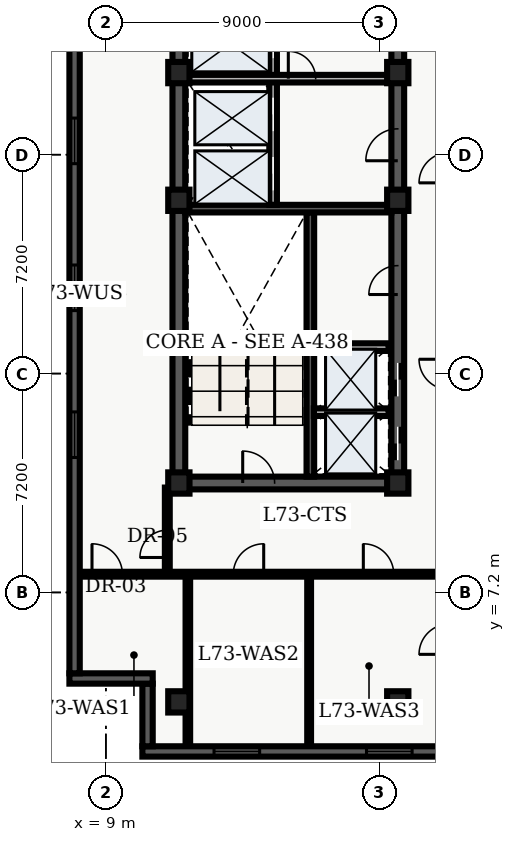
"""IFC4 building model, lengths in metres.
Left out: names, types, materials, properties, quantities, classifications, styles, units other than length and angle.
Written with IfcOpenShell. Run it as: python <this file> out.ifc"""

import sys

from ifc_helpers import new_model, entity, si_unit, converted_unit, direction, frame, origin_with_axes, origin_2d_with_axis, place, context, subcontext, project, spatial, polyline, rectangle, outline, extrude, element, fill, save


model = new_model("IFC4")
c1 = context("Model", 3, precision=1e-05, world=origin_with_axes(), true_north=direction((0.0, 1.0)))
c2 = subcontext(c1, "Body", "Model", "MODEL_VIEW")
j1 = project(units=[si_unit("LENGTHUNIT", "METRE"), converted_unit("PLANEANGLEUNIT", "DEGREE", entity("IfcPlaneAngleMeasure", 0.017), si_unit("PLANEANGLEUNIT", "RADIAN"), dimensions=[0, 0, 0, 0, 0, 0, 0])], contexts=[c1])
p1 = place(None, origin_with_axes())
s1 = spatial("IfcSite", under=j1, at=p1, CompositionType="ELEMENT")
p2 = place(p1, origin_with_axes())
s2 = spatial("IfcBuilding", under=s1, at=p2, CompositionType="ELEMENT")
p3 = place(p2, frame((0.0, 0.0, 295.8), z_axis=(0.0, 0.0, 1.0), x_axis=(1.0, 0.0, 0.0)))
s3 = spatial("IfcBuildingStorey", under=s2, at=p3, CompositionType="ELEMENT", Elevation=295.8)
p4 = place(p3, frame((11.4, 10.8, 0.0), z_axis=(0.0, 0.0, 1.0), x_axis=(0.0, 1.0, 0.0)))
e1 = element("IfcWall", 1, at=p4, inside=s3, PredefinedType="SHEAR", context=c2, shape_type="SweptSolid", body=[
    extrude(outline(polyline([(0.0, -0.21), (27.0, -0.21), (27.0, 0.21), (0.0, 0.21), (0.0, -0.21)])), origin_with_axes(), (0.0, 0.0, 1.0), 3.66),
])
p5 = place(p3, frame((11.4, 10.8, 0.0), z_axis=(0.0, 0.0, 1.0), x_axis=(1.0, 0.0, 0.0)))
e2 = element("IfcWall", 2, at=p5, inside=s3, PredefinedType="SHEAR", context=c2, shape_type="SweptSolid", body=[
    extrude(outline(polyline([(0.0, -0.21), (7.2, -0.21), (7.2, 0.21), (0.0, 0.21), (0.0, -0.21)])), origin_with_axes(), (0.0, 0.0, 1.0), 3.66),
])
p6 = place(p5, frame((2.625, 0.0, 0.0), z_axis=(0.0, 0.0, 1.0), x_axis=(1.0, 0.0, 0.0)))
e3 = element("IfcOpeningElement", 3, at=p6, cuts=e2, PredefinedType="OPENING", context=c2, shape_type="SweptSolid", body=[
    extrude(rectangle(XDim=1.05, YDim=0.44, at=origin_2d_with_axis()), origin_with_axes(), (0.0, 0.0, 1.0), 2.15),
])
p7 = place(p3, frame((18.6, 10.8, 0.0), z_axis=(0.0, 0.0, 1.0), x_axis=(0.0, 1.0, 0.0)))
e4 = element("IfcWall", 4, at=p7, inside=s3, PredefinedType="SHEAR", context=c2, shape_type="SweptSolid", body=[
    extrude(outline(polyline([(0.0, -0.21), (13.5, -0.21), (13.5, 0.21), (0.0, 0.21), (0.0, -0.21)])), origin_with_axes(), (0.0, 0.0, 1.0), 3.66),
])
p8 = place(p7, frame((1.3, 0.0, 0.0), z_axis=(0.0, 0.0, 1.0), x_axis=(1.0, 0.0, 0.0)))
e5 = element("IfcOpeningElement", 5, at=p8, cuts=e4, PredefinedType="OPENING", context=c2, shape_type="SweptSolid", body=[
    extrude(rectangle(XDim=1.1, YDim=0.44, at=origin_2d_with_axis()), origin_with_axes(), (0.0, 0.0, 1.0), 2.15),
])
p9 = place(p7, frame((3.4, 0.0, 0.0), z_axis=(0.0, 0.0, 1.0), x_axis=(1.0, 0.0, 0.0)))
e6 = element("IfcOpeningElement", 6, at=p9, cuts=e4, PredefinedType="OPENING", context=c2, shape_type="SweptSolid", body=[
    extrude(rectangle(XDim=1.1, YDim=0.44, at=origin_2d_with_axis()), origin_with_axes(), (0.0, 0.0, 1.0), 2.15),
])
p10 = place(p7, frame((11.125, 0.0, 0.0), z_axis=(0.0, 0.0, 1.0), x_axis=(1.0, 0.0, 0.0)))
e7 = element("IfcOpeningElement", 7, at=p10, cuts=e4, PredefinedType="OPENING", context=c2, shape_type="SweptSolid", body=[
    extrude(rectangle(XDim=1.05, YDim=0.44, at=origin_2d_with_axis()), origin_with_axes(), (0.0, 0.0, 1.0), 2.15),
])
p11 = place(p7, frame((6.675, 0.0, 0.0), z_axis=(0.0, 0.0, 1.0), x_axis=(1.0, 0.0, 0.0)))
e8 = element("IfcOpeningElement", 8, at=p11, cuts=e4, PredefinedType="OPENING", context=c2, shape_type="SweptSolid", body=[
    extrude(rectangle(XDim=0.95, YDim=0.44, at=origin_2d_with_axis()), origin_with_axes(), (0.0, 0.0, 1.0), 2.15),
])
p12 = place(p3, frame((18.6, 24.3, 0.0), z_axis=(0.0, 0.0, 1.0), x_axis=(0.0, 1.0, 0.0)))
e9 = element("IfcWall", 9, at=p12, inside=s3, PredefinedType="SHEAR", context=c2, shape_type="SweptSolid", body=[
    extrude(outline(polyline([(0.0, -0.21), (13.5, -0.21), (13.5, 0.21), (0.0, 0.21), (0.0, -0.21)])), origin_with_axes(), (0.0, 0.0, 1.0), 3.66),
])
p13 = place(p12, frame((8.525, 0.0, 0.0), z_axis=(0.0, 0.0, 1.0), x_axis=(1.0, 0.0, 0.0)))
e10 = element("IfcOpeningElement", 10, at=p13, cuts=e9, PredefinedType="OPENING", context=c2, shape_type="SweptSolid", body=[
    extrude(rectangle(XDim=1.05, YDim=0.44, at=origin_2d_with_axis()), origin_with_axes(), (0.0, 0.0, 1.0), 2.15),
])
p14 = place(p3, frame((15.725, 11.01, 0.0), z_axis=(0.0, 0.0, 1.0), x_axis=(0.0, 1.0, 0.0)))
e11 = element("IfcWall", 11, at=p14, inside=s3, PredefinedType="SHEAR", context=c2, shape_type="SweptSolid", body=[
    extrude(outline(polyline([(0.0, -0.125), (8.69, -0.125), (8.69, 0.125), (0.0, 0.125), (0.0, -0.125)])), origin_with_axes(), (0.0, 0.0, 1.0), 3.66),
])
p15 = place(p3, frame((11.61, 19.825, 0.0), z_axis=(0.0, 0.0, 1.0), x_axis=(1.0, 0.0, 0.0)))
e12 = element("IfcWall", 12, at=p15, inside=s3, PredefinedType="SHEAR", context=c2, shape_type="SweptSolid", body=[
    extrude(outline(polyline([(0.0, -0.125), (6.78, -0.125), (6.78, 0.125), (0.0, 0.125), (0.0, -0.125)])), origin_with_axes(), (0.0, 0.0, 1.0), 3.66),
])
p16 = place(p3, frame((14.5, 19.95, 0.0), z_axis=(0.0, 0.0, 1.0), x_axis=(0.0, 1.0, 0.0)))
e13 = element("IfcWall", 13, at=p16, inside=s3, PredefinedType="SOLIDWALL", context=c2, shape_type="SweptSolid", body=[
    extrude(outline(polyline([(0.0, -0.125), (6.25, -0.125), (6.25, 0.125), (0.0, 0.125), (0.0, -0.125)])), origin_with_axes(), (0.0, 0.0, 1.0), 2.7),
])
p17 = place(p16, frame((1.025, 0.0, 0.0), z_axis=(0.0, 0.0, 1.0), x_axis=(1.0, 0.0, 0.0)))
e14 = element("IfcOpeningElement", 14, at=p17, cuts=e13, PredefinedType="OPENING", context=c2, shape_type="SweptSolid", body=[
    extrude(rectangle(XDim=1.1, YDim=0.27, at=origin_2d_with_axis()), origin_with_axes(), (0.0, 0.0, 1.0), 2.15),
])
p18 = place(p16, frame((2.975, 0.0, 0.0), z_axis=(0.0, 0.0, 1.0), x_axis=(1.0, 0.0, 0.0)))
e15 = element("IfcOpeningElement", 15, at=p18, cuts=e13, PredefinedType="OPENING", context=c2, shape_type="SweptSolid", body=[
    extrude(rectangle(XDim=1.1, YDim=0.27, at=origin_2d_with_axis()), origin_with_axes(), (0.0, 0.0, 1.0), 2.15),
])
p19 = place(p16, frame((5.425, 0.0, 0.0), z_axis=(0.0, 0.0, 1.0), x_axis=(1.0, 0.0, 0.0)))
e16 = element("IfcOpeningElement", 16, at=p19, cuts=e13, PredefinedType="OPENING", context=c2, shape_type="SweptSolid", body=[
    extrude(rectangle(XDim=1.2, YDim=0.27, at=origin_2d_with_axis()), origin_with_axes(), (0.0, 0.0, 1.0), 2.15),
])
p20 = place(p3, frame((11.7, 24.1, 0.0), z_axis=(0.0, 0.0, 1.0), x_axis=(1.0, 0.0, 0.0)))
e17 = element("IfcWall", 17, at=p20, inside=s3, PredefinedType="SOLIDWALL", context=c2, shape_type="SweptSolid", body=[
    extrude(outline(polyline([(0.0, -0.125), (6.6, -0.125), (6.6, 0.125), (0.0, 0.125), (0.0, -0.125)])), origin_with_axes(), (0.0, 0.0, 1.0), 2.7),
])
p21 = place(p20, frame((3.75, 0.0, 0.0), z_axis=(0.0, 0.0, 1.0), x_axis=(1.0, 0.0, 0.0)))
e18 = element("IfcOpeningElement", 18, at=p21, cuts=e17, PredefinedType="OPENING", context=c2, shape_type="SweptSolid", body=[
    extrude(rectangle(XDim=0.9, YDim=0.27, at=origin_2d_with_axis()), origin_with_axes(), (0.0, 0.0, 1.0), 2.15),
])
for number, where, z_axis, x_axis in (
    (19, (11.4, 3.6, 0.0), (0.0, 0.0, 1.0), (1.0, 0.0, 0.0)),
    (20, (11.4, 10.8, 0.0), (0.0, 0.0, 1.0), (1.0, 0.0, 0.0)),
    (21, (11.4, 20.1, 0.0), (0.0, 0.0, 1.0), (1.0, 0.0, 0.0)),
    (22, (11.4, 24.3, 0.0), (0.0, 0.0, 1.0), (1.0, 0.0, 0.0)),
    (23, (18.6, 3.6, 0.0), (0.0, 0.0, 1.0), (1.0, 0.0, 0.0)),
    (24, (18.6, 10.8, 0.0), (0.0, 0.0, 1.0), (1.0, 0.0, 0.0)),
    (25, (18.6, 20.1, 0.0), (0.0, 0.0, 1.0), (1.0, 0.0, 0.0)),
    (26, (18.6, 24.3, 0.0), (0.0, 0.0, 1.0), (1.0, 0.0, 0.0)),
):
    element("IfcColumn", number, at=place(p3, frame(where, z_axis=z_axis, x_axis=x_axis)), inside=s3, PredefinedType="COLUMN", context=c2, shape_type="SweptSolid", body=[
        extrude(rectangle(XDim=0.7, YDim=0.7, at=origin_2d_with_axis()), origin_with_axes(), (0.0, 0.0, 1.0), 3.9),
    ])
for number, where, z_axis, x_axis in (
    (27, (15.84, 13.13, 0.0), (0.0, 0.0, 1.0), (1.0, 0.0, 0.0)),
    (28, (15.84, 15.27, 0.0), (0.0, 0.0, 1.0), (1.0, 0.0, 0.0)),
):
    element("IfcWall", number, at=place(p3, frame(where, z_axis=z_axis, x_axis=x_axis)), inside=s3, PredefinedType="SOLIDWALL", context=c2, shape_type="SweptSolid", body=[
        extrude(outline(polyline([(0.0, -0.125), (2.46, -0.125), (2.46, 0.125), (0.0, 0.125), (0.0, -0.125)])), origin_with_axes(), (0.0, 0.0, 1.0), 2.7),
    ])
p22 = place(p3, frame((8.135, 7.8, 0.0), z_axis=(0.0, 0.0, 1.0), x_axis=(1.0, 0.0, 0.0)))
e29 = element("IfcWall", 29, at=p22, inside=s3, PredefinedType="PARTITIONING", context=c2, shape_type="SweptSolid", body=[
    extrude(outline(polyline([(0.0, -0.08), (12.165, -0.08), (12.165, 0.08), (0.0, 0.08), (0.0, -0.08)])), origin_with_axes(), (0.0, 0.0, 1.0), 2.7),
])
p23 = place(p22, frame((0.908, 0.0, 0.0), z_axis=(0.0, 0.0, 1.0), x_axis=(1.0, 0.0, 0.0)))
e30 = element("IfcOpeningElement", 30, at=p23, cuts=e29, PredefinedType="OPENING", context=c2, shape_type="SweptSolid", body=[
    extrude(rectangle(XDim=1.0, YDim=0.18, at=origin_2d_with_axis()), origin_with_axes(), (0.0, 0.0, 1.0), 2.15),
])
p24 = place(p22, frame((5.556, 0.0, 0.0), z_axis=(0.0, 0.0, 1.0), x_axis=(1.0, 0.0, 0.0)))
e31 = element("IfcOpeningElement", 31, at=p24, cuts=e29, PredefinedType="OPENING", context=c2, shape_type="SweptSolid", body=[
    extrude(rectangle(XDim=1.0, YDim=0.18, at=origin_2d_with_axis()), origin_with_axes(), (0.0, 0.0, 1.0), 2.15),
])
p25 = place(p22, frame((9.832, 0.0, 0.0), z_axis=(0.0, 0.0, 1.0), x_axis=(1.0, 0.0, 0.0)))
e32 = element("IfcOpeningElement", 32, at=p25, cuts=e29, PredefinedType="OPENING", context=c2, shape_type="SweptSolid", body=[
    extrude(rectangle(XDim=1.0, YDim=0.18, at=origin_2d_with_axis()), origin_with_axes(), (0.0, 0.0, 1.0), 2.15),
])
p26 = place(p3, frame((11.02, 7.8, 0.0), z_axis=(0.0, 0.0, 1.0), x_axis=(0.0, 1.0, 0.0)))
e33 = element("IfcWall", 33, at=p26, inside=s3, PredefinedType="PARTITIONING", context=c2, shape_type="SweptSolid", body=[
    extrude(outline(polyline([(0.0, -0.08), (2.85, -0.08), (2.85, 0.08), (0.0, 0.08), (0.0, -0.08)])), origin_with_axes(), (0.0, 0.0, 1.0), 2.7),
])
p27 = place(p26, frame((1.0, 0.0, 0.0), z_axis=(0.0, 0.0, 1.0), x_axis=(1.0, 0.0, 0.0)))
e34 = element("IfcOpeningElement", 34, at=p27, cuts=e33, PredefinedType="OPENING", context=c2, shape_type="SweptSolid", body=[
    extrude(rectangle(XDim=0.9, YDim=0.18, at=origin_2d_with_axis()), origin_with_axes(), (0.0, 0.0, 1.0), 2.15),
])
p28 = place(p3, frame((11.696, 2.135, 0.0), z_axis=(0.0, 0.0, 1.0), x_axis=(0.0, 1.0, 0.0)))
e35 = element("IfcWall", 35, at=p28, inside=s3, PredefinedType="PARTITIONING", context=c2, shape_type="SweptSolid", body=[
    extrude(outline(polyline([(0.0, -0.075), (5.565, -0.075), (5.565, 0.075), (0.0, 0.075), (0.0, -0.075)])), origin_with_axes(), (0.0, 0.0, 1.0), 2.7),
])
p29 = place(p3, frame((15.685, 2.135, 0.0), z_axis=(0.0, 0.0, 1.0), x_axis=(0.0, 1.0, 0.0)))
e36 = element("IfcWall", 36, at=p29, inside=s3, PredefinedType="PARTITIONING", context=c2, shape_type="SweptSolid", body=[
    extrude(outline(polyline([(0.0, -0.062), (5.565, -0.062), (5.565, 0.062), (0.0, 0.062), (0.0, -0.062)])), origin_with_axes(), (0.0, 0.0, 1.0), 2.7),
])
p30 = place(p3, frame((31.46, 1.97, 0.0), z_axis=(0.0, 0.0, 1.0), x_axis=(-1.0, 0.0, 0.0)))
e37 = element("IfcWall", 37, at=p30, inside=s3, PredefinedType="SOLIDWALL", context=c2, shape_type="SweptSolid", body=[
    extrude(outline(polyline([(0.0, -0.17), (21.26, -0.17), (21.26, 0.17), (0.0, 0.17), (0.0, -0.17)])), origin_with_axes(), (0.0, 0.0, 1.0), 3.66),
])
p31 = place(p30, frame((2.658, 0.0, 0.45), z_axis=(0.0, 0.0, 1.0), x_axis=(1.0, 0.0, 0.0)))
e38 = element("IfcOpeningElement", 38, at=p31, cuts=e37, PredefinedType="OPENING", context=c2, shape_type="SweptSolid", body=[
    extrude(rectangle(XDim=1.5, YDim=0.36, at=origin_2d_with_axis()), origin_with_axes(), (0.0, 0.0, 1.0), 2.1),
])
p32 = place(p30, frame((8.123, 0.0, 0.45), z_axis=(0.0, 0.0, 1.0), x_axis=(1.0, 0.0, 0.0)))
e39 = element("IfcOpeningElement", 39, at=p32, cuts=e37, PredefinedType="OPENING", context=c2, shape_type="SweptSolid", body=[
    extrude(rectangle(XDim=1.5, YDim=0.36, at=origin_2d_with_axis()), origin_with_axes(), (0.0, 0.0, 1.0), 2.1),
])
p33 = place(p30, frame((13.138, 0.0, 0.45), z_axis=(0.0, 0.0, 1.0), x_axis=(1.0, 0.0, 0.0)))
e40 = element("IfcOpeningElement", 40, at=p33, cuts=e37, PredefinedType="OPENING", context=c2, shape_type="SweptSolid", body=[
    extrude(rectangle(XDim=1.5, YDim=0.36, at=origin_2d_with_axis()), origin_with_axes(), (0.0, 0.0, 1.0), 2.1),
])
p34 = place(p30, frame((18.153, 0.0, 0.45), z_axis=(0.0, 0.0, 1.0), x_axis=(1.0, 0.0, 0.0)))
e41 = element("IfcOpeningElement", 41, at=p34, cuts=e37, PredefinedType="OPENING", context=c2, shape_type="SweptSolid", body=[
    extrude(rectangle(XDim=1.5, YDim=0.36, at=origin_2d_with_axis()), origin_with_axes(), (0.0, 0.0, 1.0), 2.1),
])
p35 = place(p3, frame((10.37, 2.14, 0.0), z_axis=(0.0, 0.0, 1.0), x_axis=(0.0, 1.0, 0.0)))
e42 = element("IfcWall", 42, at=p35, inside=s3, PredefinedType="SOLIDWALL", context=c2, shape_type="SweptSolid", body=[
    extrude(outline(polyline([(0.0, -0.17), (2.06, -0.17), (2.06, 0.17), (0.0, 0.17), (0.0, -0.17)])), origin_with_axes(), (0.0, 0.0, 1.0), 3.66),
])
p36 = place(p3, frame((10.54, 4.37, 0.0), z_axis=(0.0, 0.0, 1.0), x_axis=(-1.0, 0.0, 0.0)))
e43 = element("IfcWall", 43, at=p36, inside=s3, PredefinedType="SOLIDWALL", context=c2, shape_type="SweptSolid", body=[
    extrude(outline(polyline([(0.0, -0.17), (2.74, -0.17), (2.74, 0.17), (0.0, 0.17), (0.0, -0.17)])), origin_with_axes(), (0.0, 0.0, 1.0), 3.66),
])
p37 = place(p3, frame((7.97, 4.54, 0.0), z_axis=(0.0, 0.0, 1.0), x_axis=(0.0, 1.0, 0.0)))
e44 = element("IfcWall", 44, at=p37, inside=s3, PredefinedType="SOLIDWALL", context=c2, shape_type="SweptSolid", body=[
    extrude(outline(polyline([(0.0, -0.17), (39.86, -0.17), (39.86, 0.17), (0.0, 0.17), (0.0, -0.17)])), origin_with_axes(), (0.0, 0.0, 1.0), 3.66),
])
p38 = place(p37, frame((7.849, 0.0, 0.45), z_axis=(0.0, 0.0, 1.0), x_axis=(1.0, 0.0, 0.0)))
e45 = element("IfcOpeningElement", 45, at=p38, cuts=e44, PredefinedType="OPENING", context=c2, shape_type="SweptSolid", body=[
    extrude(rectangle(XDim=1.5, YDim=0.36, at=origin_2d_with_axis()), origin_with_axes(), (0.0, 0.0, 1.0), 2.1),
])
p39 = place(p37, frame((12.681, 0.0, 0.45), z_axis=(0.0, 0.0, 1.0), x_axis=(1.0, 0.0, 0.0)))
e46 = element("IfcOpeningElement", 46, at=p39, cuts=e44, PredefinedType="OPENING", context=c2, shape_type="SweptSolid", body=[
    extrude(rectangle(XDim=1.5, YDim=0.36, at=origin_2d_with_axis()), origin_with_axes(), (0.0, 0.0, 1.0), 2.1),
])
p40 = place(p37, frame((17.514, 0.0, 0.45), z_axis=(0.0, 0.0, 1.0), x_axis=(1.0, 0.0, 0.0)))
e47 = element("IfcOpeningElement", 47, at=p40, cuts=e44, PredefinedType="OPENING", context=c2, shape_type="SweptSolid", body=[
    extrude(rectangle(XDim=1.5, YDim=0.36, at=origin_2d_with_axis()), origin_with_axes(), (0.0, 0.0, 1.0), 2.1),
])
p41 = place(p37, frame((23.196, 0.0, 0.45), z_axis=(0.0, 0.0, 1.0), x_axis=(1.0, 0.0, 0.0)))
e48 = element("IfcOpeningElement", 48, at=p41, cuts=e44, PredefinedType="OPENING", context=c2, shape_type="SweptSolid", body=[
    extrude(rectangle(XDim=1.5, YDim=0.36, at=origin_2d_with_axis()), origin_with_axes(), (0.0, 0.0, 1.0), 2.1),
])
p42 = place(p37, frame((27.179, 0.0, 0.45), z_axis=(0.0, 0.0, 1.0), x_axis=(1.0, 0.0, 0.0)))
e49 = element("IfcOpeningElement", 49, at=p42, cuts=e44, PredefinedType="OPENING", context=c2, shape_type="SweptSolid", body=[
    extrude(rectangle(XDim=1.5, YDim=0.36, at=origin_2d_with_axis()), origin_with_axes(), (0.0, 0.0, 1.0), 2.1),
])
p43 = place(p37, frame((32.011, 0.0, 0.45), z_axis=(0.0, 0.0, 1.0), x_axis=(1.0, 0.0, 0.0)))
e50 = element("IfcOpeningElement", 50, at=p43, cuts=e44, PredefinedType="OPENING", context=c2, shape_type="SweptSolid", body=[
    extrude(rectangle(XDim=1.5, YDim=0.36, at=origin_2d_with_axis()), origin_with_axes(), (0.0, 0.0, 1.0), 2.1),
])
p44 = place(p37, frame((37.294, 0.0, 0.45), z_axis=(0.0, 0.0, 1.0), x_axis=(1.0, 0.0, 0.0)))
e51 = element("IfcOpeningElement", 51, at=p44, cuts=e44, PredefinedType="OPENING", context=c2, shape_type="SweptSolid", body=[
    extrude(rectangle(XDim=1.5, YDim=0.36, at=origin_2d_with_axis()), origin_with_axes(), (0.0, 0.0, 1.0), 2.1),
])
p45 = place(p7, frame((1.3, 0.0, 0.0), z_axis=(0.0, 0.0, 1.0), x_axis=(1.0, 0.0, 0.0)))
e52 = element("IfcDoor", 52, at=p45, inside=s3, OperationType="SLIDING_TO_LEFT", PredefinedType="DOOR", context=c2, shape_type="SweptSolid", body=[
    extrude(rectangle(XDim=1.1, YDim=0.09, at=origin_2d_with_axis()), origin_with_axes(), (0.0, 0.0, 1.0), 2.15),
])
fill(e5, e52)
p46 = place(p7, frame((3.4, 0.0, 0.0), z_axis=(0.0, 0.0, 1.0), x_axis=(1.0, 0.0, 0.0)))
e53 = element("IfcDoor", 53, at=p46, inside=s3, OperationType="SLIDING_TO_RIGHT", PredefinedType="DOOR", context=c2, shape_type="SweptSolid", body=[
    extrude(rectangle(XDim=1.1, YDim=0.09, at=origin_2d_with_axis()), origin_with_axes(), (0.0, 0.0, 1.0), 2.15),
])
fill(e6, e53)
p47 = place(p16, frame((1.025, 0.0, 0.0), z_axis=(0.0, 0.0, 1.0), x_axis=(1.0, 0.0, 0.0)))
e54 = element("IfcDoor", 54, at=p47, inside=s3, OperationType="SLIDING_TO_LEFT", PredefinedType="DOOR", context=c2, shape_type="SweptSolid", body=[
    extrude(rectangle(XDim=1.1, YDim=0.09, at=origin_2d_with_axis()), origin_with_axes(), (0.0, 0.0, 1.0), 2.15),
])
fill(e14, e54)
p48 = place(p16, frame((2.975, 0.0, 0.0), z_axis=(0.0, 0.0, 1.0), x_axis=(1.0, 0.0, 0.0)))
e55 = element("IfcDoor", 55, at=p48, inside=s3, OperationType="SLIDING_TO_RIGHT", PredefinedType="DOOR", context=c2, shape_type="SweptSolid", body=[
    extrude(rectangle(XDim=1.1, YDim=0.09, at=origin_2d_with_axis()), origin_with_axes(), (0.0, 0.0, 1.0), 2.15),
])
fill(e15, e55)
p49 = place(p16, frame((5.425, 0.0, 0.0), z_axis=(0.0, 0.0, 1.0), x_axis=(1.0, 0.0, 0.0)))
e56 = element("IfcDoor", 56, at=p49, inside=s3, OperationType="DOUBLE_DOOR_SLIDING", PredefinedType="DOOR", context=c2, shape_type="SweptSolid", body=[
    extrude(rectangle(XDim=1.2, YDim=0.09, at=origin_2d_with_axis()), origin_with_axes(), (0.0, 0.0, 1.0), 2.15),
])
fill(e16, e56)
p50 = place(p5, frame((2.625, 0.0, 0.0), z_axis=(0.0, 0.0, 1.0), x_axis=(1.0, 0.0, 0.0)))
e57 = element("IfcDoor", 57, at=p50, inside=s3, OperationType="SINGLE_SWING_LEFT", PredefinedType="DOOR", context=c2, shape_type="SweptSolid", body=[
    extrude(rectangle(XDim=1.05, YDim=0.09, at=origin_2d_with_axis()), origin_with_axes(), (0.0, 0.0, 1.0), 2.15),
])
fill(e3, e57)
p51 = place(p7, frame((11.125, 0.0, 0.0), z_axis=(0.0, 0.0, 1.0), x_axis=(1.0, 0.0, 0.0)))
e58 = element("IfcDoor", 58, at=p51, inside=s3, OperationType="SINGLE_SWING_LEFT", PredefinedType="DOOR", context=c2, shape_type="SweptSolid", body=[
    extrude(rectangle(XDim=1.05, YDim=0.09, at=origin_2d_with_axis()), origin_with_axes(), (0.0, 0.0, 1.0), 2.15),
])
fill(e7, e58)
p52 = place(p20, frame((3.75, 0.0, 0.0), z_axis=(0.0, 0.0, 1.0), x_axis=(1.0, 0.0, 0.0)))
e59 = element("IfcDoor", 59, at=p52, inside=s3, OperationType="SINGLE_SWING_LEFT", PredefinedType="DOOR", context=c2, shape_type="SweptSolid", body=[
    extrude(rectangle(XDim=0.9, YDim=0.09, at=origin_2d_with_axis()), origin_with_axes(), (0.0, 0.0, 1.0), 2.15),
])
fill(e18, e59)
p53 = place(p7, frame((6.675, 0.0, 0.0), z_axis=(0.0, 0.0, 1.0), x_axis=(1.0, 0.0, 0.0)))
e60 = element("IfcDoor", 60, at=p53, inside=s3, OperationType="SINGLE_SWING_LEFT", PredefinedType="DOOR", context=c2, shape_type="SweptSolid", body=[
    extrude(rectangle(XDim=0.95, YDim=0.09, at=origin_2d_with_axis()), origin_with_axes(), (0.0, 0.0, 1.0), 2.15),
])
fill(e8, e60)
p54 = place(p26, frame((1.0, 0.0, 0.0), z_axis=(0.0, 0.0, 1.0), x_axis=(1.0, 0.0, 0.0)))
e61 = element("IfcDoor", 61, at=p54, inside=s3, OperationType="SINGLE_SWING_LEFT", PredefinedType="DOOR", context=c2, shape_type="SweptSolid", body=[
    extrude(rectangle(XDim=0.9, YDim=0.09, at=origin_2d_with_axis()), origin_with_axes(), (0.0, 0.0, 1.0), 2.15),
])
fill(e34, e61)
p55 = place(p22, frame((0.908, 0.0, 0.0), z_axis=(0.0, 0.0, 1.0), x_axis=(1.0, 0.0, 0.0)))
e62 = element("IfcDoor", 62, at=p55, inside=s3, OperationType="SINGLE_SWING_LEFT", PredefinedType="DOOR", context=c2, shape_type="SweptSolid", body=[
    extrude(rectangle(XDim=1.0, YDim=0.09, at=origin_2d_with_axis()), origin_with_axes(), (0.0, 0.0, 1.0), 2.15),
])
fill(e30, e62)
p56 = place(p22, frame((5.556, 0.0, 0.0), z_axis=(0.0, 0.0, 1.0), x_axis=(1.0, 0.0, 0.0)))
e63 = element("IfcDoor", 63, at=p56, inside=s3, OperationType="SINGLE_SWING_RIGHT", PredefinedType="DOOR", context=c2, shape_type="SweptSolid", body=[
    extrude(rectangle(XDim=1.0, YDim=0.09, at=origin_2d_with_axis()), origin_with_axes(), (0.0, 0.0, 1.0), 2.15),
])
fill(e31, e63)
p57 = place(p22, frame((9.832, 0.0, 0.0), z_axis=(0.0, 0.0, 1.0), x_axis=(1.0, 0.0, 0.0)))
e64 = element("IfcDoor", 64, at=p57, inside=s3, OperationType="SINGLE_SWING_LEFT", PredefinedType="DOOR", context=c2, shape_type="SweptSolid", body=[
    extrude(rectangle(XDim=1.0, YDim=0.09, at=origin_2d_with_axis()), origin_with_axes(), (0.0, 0.0, 1.0), 2.15),
])
fill(e32, e64)
p58 = place(p30, frame((13.138, 0.0, 0.45), z_axis=(0.0, 0.0, 1.0), x_axis=(1.0, 0.0, 0.0)))
e65 = element("IfcWindow", 65, at=p58, inside=s3, PredefinedType="WINDOW", context=c2, shape_type="SweptSolid", body=[
    extrude(rectangle(XDim=1.5, YDim=0.09, at=origin_2d_with_axis()), origin_with_axes(), (0.0, 0.0, 1.0), 2.1),
])
fill(e40, e65)
p59 = place(p30, frame((18.153, 0.0, 0.45), z_axis=(0.0, 0.0, 1.0), x_axis=(1.0, 0.0, 0.0)))
e66 = element("IfcWindow", 66, at=p59, inside=s3, PredefinedType="WINDOW", context=c2, shape_type="SweptSolid", body=[
    extrude(rectangle(XDim=1.5, YDim=0.09, at=origin_2d_with_axis()), origin_with_axes(), (0.0, 0.0, 1.0), 2.1),
])
fill(e41, e66)
p60 = place(p37, frame((7.849, 0.0, 0.45), z_axis=(0.0, 0.0, 1.0), x_axis=(1.0, 0.0, 0.0)))
e67 = element("IfcWindow", 67, at=p60, inside=s3, PredefinedType="WINDOW", context=c2, shape_type="SweptSolid", body=[
    extrude(rectangle(XDim=1.5, YDim=0.09, at=origin_2d_with_axis()), origin_with_axes(), (0.0, 0.0, 1.0), 2.1),
])
fill(e45, e67)
p61 = place(p37, frame((12.681, 0.0, 0.45), z_axis=(0.0, 0.0, 1.0), x_axis=(1.0, 0.0, 0.0)))
e68 = element("IfcWindow", 68, at=p61, inside=s3, PredefinedType="WINDOW", context=c2, shape_type="SweptSolid", body=[
    extrude(rectangle(XDim=1.5, YDim=0.09, at=origin_2d_with_axis()), origin_with_axes(), (0.0, 0.0, 1.0), 2.1),
])
fill(e46, e68)
p62 = place(p37, frame((17.514, 0.0, 0.45), z_axis=(0.0, 0.0, 1.0), x_axis=(1.0, 0.0, 0.0)))
e69 = element("IfcWindow", 69, at=p62, inside=s3, PredefinedType="WINDOW", context=c2, shape_type="SweptSolid", body=[
    extrude(rectangle(XDim=1.5, YDim=0.09, at=origin_2d_with_axis()), origin_with_axes(), (0.0, 0.0, 1.0), 2.1),
])
fill(e47, e69)
save(model, sys.argv[1])
